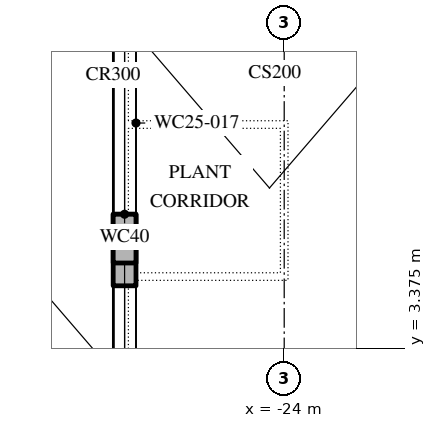
"""IFC4 building model, lengths in metres.
Left out: names, types, materials, properties, quantities, classifications, styles, units other than length and angle.
Written with IfcOpenShell. Run it as: python <this file> out.ifc"""

import sys

from ifc_helpers import new_model, si_unit, direction, frame, frame_2d, origin, place, context, subcontext, project, spatial, polyline, rectangle, outline, extrude, element, fill, save


model = new_model("IFC4")
c1 = context("Model", 3, precision=1e-05, world=origin(), true_north=direction((0.0, 1.0)))
c2 = subcontext(c1, "Body", "Model", "MODEL_VIEW")
j1 = project(units=[si_unit("LENGTHUNIT", "METRE"), si_unit("PLANEANGLEUNIT", "RADIAN")], contexts=[c1])
p1 = place(None, origin())
s1 = spatial("IfcSite", under=j1, at=p1, CompositionType="ELEMENT")
p2 = place(p1, origin())
s2 = spatial("IfcBuilding", under=s1, at=p2, CompositionType="ELEMENT")
p3 = place(p2, frame((0.0, 0.0, 394.2)))
s3 = spatial("IfcBuildingStorey", under=s2, at=p3, CompositionType="ELEMENT", Elevation=394.2)
p4 = place(p3, frame((-26.1, 11.996, 0.0), z_axis=(0.0, 0.0, 1.0), x_axis=(0.0, -1.0, 0.0)))
e1 = element("IfcWall", 1, at=p4, inside=s3, PredefinedType="STANDARD", context=c2, shape_type="SweptSolid", body=[
    extrude(rectangle(XDim=7.198, YDim=0.3, at=frame_2d((3.599, 0.0))), origin(), (0.0, 0.0, 1.0), 4.0),
])
p5 = place(p4, frame((1.756, 0.0, 0.8)))
e2 = element("IfcOpeningElement", 2, at=p5, cuts=e1, PredefinedType="OPENING", context=c2, shape_type="SweptSolid", body=[
    extrude(outline(polyline([(0.0, 0.0), (2.4, 0.0), (2.4, 1.25), (2.377, 1.488), (2.31, 1.717), (2.2, 1.929), (2.051, 2.116), (1.87, 2.272), (1.663, 2.391), (1.437, 2.468), (1.2, 2.5), (0.963, 2.468), (0.737, 2.391), (0.53, 2.272), (0.349, 2.116), (0.2, 1.929), (0.09, 1.717), (0.023, 1.488), (0.0, 1.25), (0.0, 0.0)])), frame((0.0, 0.16, 0.0), z_axis=(0.0, -1.0, 0.0), x_axis=(1.0, 0.0, 0.0)), (0.0, 0.0, 1.0), 0.32),
])
p6 = place(p4, frame((4.456, 0.0, 0.8)))
e3 = element("IfcOpeningElement", 3, at=p6, cuts=e1, PredefinedType="OPENING", context=c2, shape_type="SweptSolid", body=[
    extrude(outline(polyline([(0.0, 0.0), (2.4, 0.0), (2.4, 1.25), (2.377, 1.488), (2.31, 1.717), (2.2, 1.929), (2.051, 2.116), (1.87, 2.272), (1.663, 2.391), (1.437, 2.468), (1.2, 2.5), (0.963, 2.468), (0.737, 2.391), (0.53, 2.272), (0.349, 2.116), (0.2, 1.929), (0.09, 1.717), (0.023, 1.488), (0.0, 1.25), (0.0, 0.0)])), frame((0.0, 0.16, 0.0), z_axis=(0.0, -1.0, 0.0), x_axis=(1.0, 0.0, 0.0)), (0.0, 0.0, 1.0), 0.32),
])
p7 = place(p3, frame((-26.1, 11.996, 4.0), z_axis=(0.0, 0.0, 1.0), x_axis=(0.0, -1.0, 0.0)))
e4 = element("IfcWall", 4, at=p7, inside=s3, PredefinedType="STANDARD", context=c2, shape_type="SweptSolid", body=[
    extrude(outline(polyline([(0.0, 0.0), (7.198, 0.0), (7.198, 8.011), (0.0, 3.156), (0.0, 0.0)])), frame((0.0, 0.15, 0.0), z_axis=(0.0, -1.0, 0.0), x_axis=(1.0, 0.0, 0.0)), (0.0, 0.0, 1.0), 0.3),
])
p8 = place(p7, frame((1.756, 0.0, 0.8)))
e5 = element("IfcOpeningElement", 5, at=p8, cuts=e4, PredefinedType="OPENING", context=c2, shape_type="SweptSolid", body=[
    extrude(outline(polyline([(0.0, 0.0), (2.4, 0.0), (2.4, 1.0), (2.376, 1.221), (2.304, 1.431), (2.188, 1.621), (2.034, 1.781), (1.849, 1.904), (1.641, 1.983), (1.422, 2.016), (1.2, 2.0), (0.978, 2.016), (0.759, 1.983), (0.551, 1.904), (0.366, 1.781), (0.212, 1.621), (0.096, 1.431), (0.024, 1.221), (0.0, 1.0), (0.0, 0.0)])), frame((0.0, 0.16, 0.0), z_axis=(0.0, -1.0, 0.0), x_axis=(1.0, 0.0, 0.0)), (0.0, 0.0, 1.0), 0.32),
])
p9 = place(p7, frame((4.456, 0.0, 0.8)))
e6 = element("IfcOpeningElement", 6, at=p9, cuts=e4, PredefinedType="OPENING", context=c2, shape_type="SweptSolid", body=[
    extrude(outline(polyline([(0.0, 0.0), (2.4, 0.0), (2.4, 2.0), (2.379, 2.305), (2.318, 2.605), (2.216, 2.894), (2.077, 3.166), (1.902, 3.417), (1.695, 3.643), (1.46, 3.838), (1.2, 4.0), (0.94, 3.838), (0.705, 3.643), (0.498, 3.417), (0.323, 3.166), (0.184, 2.894), (0.082, 2.605), (0.021, 2.305), (0.0, 2.0), (0.0, 0.0)])), frame((0.0, 0.16, 0.0), z_axis=(0.0, -1.0, 0.0), x_axis=(1.0, 0.0, 0.0)), (0.0, 0.0, 1.0), 0.32),
])
p10 = place(p3, frame((-26.1, 4.798, 0.0), z_axis=(0.0, 0.0, 1.0), x_axis=(0.0, -1.0, 0.0)))
e7 = element("IfcWall", 7, at=p10, inside=s3, PredefinedType="STANDARD", context=c2, shape_type="SweptSolid", body=[
    extrude(rectangle(XDim=7.198, YDim=0.3, at=frame_2d((3.599, 0.0))), origin(), (0.0, 0.0, 1.0), 4.0),
])
p11 = place(p10, frame((0.6, 0.0, 0.8)))
e8 = element("IfcOpeningElement", 8, at=p11, cuts=e7, PredefinedType="OPENING", context=c2, shape_type="SweptSolid", body=[
    extrude(outline(polyline([(0.0, 0.0), (2.4, 0.0), (2.4, 1.25), (2.377, 1.488), (2.31, 1.717), (2.2, 1.929), (2.051, 2.116), (1.87, 2.272), (1.663, 2.391), (1.437, 2.468), (1.2, 2.5), (0.963, 2.468), (0.737, 2.391), (0.53, 2.272), (0.349, 2.116), (0.2, 1.929), (0.09, 1.717), (0.023, 1.488), (0.0, 1.25), (0.0, 0.0)])), frame((0.0, 0.16, 0.0), z_axis=(0.0, -1.0, 0.0), x_axis=(1.0, 0.0, 0.0)), (0.0, 0.0, 1.0), 0.32),
])
p12 = place(p10, frame((4.198, 0.0, 0.8)))
e9 = element("IfcOpeningElement", 9, at=p12, cuts=e7, PredefinedType="OPENING", context=c2, shape_type="SweptSolid", body=[
    extrude(outline(polyline([(0.0, 0.0), (2.4, 0.0), (2.4, 1.25), (2.377, 1.488), (2.31, 1.717), (2.2, 1.929), (2.051, 2.116), (1.87, 2.272), (1.663, 2.391), (1.437, 2.468), (1.2, 2.5), (0.963, 2.468), (0.737, 2.391), (0.53, 2.272), (0.349, 2.116), (0.2, 1.929), (0.09, 1.717), (0.023, 1.488), (0.0, 1.25), (0.0, 0.0)])), frame((0.0, 0.16, 0.0), z_axis=(0.0, -1.0, 0.0), x_axis=(1.0, 0.0, 0.0)), (0.0, 0.0, 1.0), 0.32),
])
p13 = place(p3, frame((-26.1, 4.798, 4.0), z_axis=(0.0, 0.0, 1.0), x_axis=(0.0, -1.0, 0.0)))
e10 = element("IfcWall", 10, at=p13, inside=s3, PredefinedType="STANDARD", context=c2, shape_type="SweptSolid", body=[
    extrude(outline(polyline([(0.0, 0.0), (7.198, 0.0), (7.198, 12.866), (0.0, 8.011), (0.0, 0.0)])), frame((0.0, 0.15, 0.0), z_axis=(0.0, -1.0, 0.0), x_axis=(1.0, 0.0, 0.0)), (0.0, 0.0, 1.0), 0.3),
])
p14 = place(p13, frame((0.3, 0.0, 1.0)))
e11 = element("IfcOpeningElement", 11, at=p14, cuts=e10, PredefinedType="OPENING", context=c2, shape_type="SweptSolid", body=[
    extrude(outline(polyline([(0.0, 0.0), (3.0, 0.0), (3.0, 2.5), (2.974, 2.882), (2.897, 3.256), (2.771, 3.617), (2.596, 3.958), (2.378, 4.272), (2.119, 4.553), (1.825, 4.798), (1.5, 5.0), (1.175, 4.798), (0.881, 4.553), (0.622, 4.272), (0.404, 3.958), (0.229, 3.617), (0.103, 3.256), (0.026, 2.882), (0.0, 2.5), (0.0, 0.0)])), frame((0.0, 0.16, 0.0), z_axis=(0.0, -1.0, 0.0), x_axis=(1.0, 0.0, 0.0)), (0.0, 0.0, 1.0), 0.32),
])
p15 = place(p13, frame((3.898, 0.0, 1.0)))
e12 = element("IfcOpeningElement", 12, at=p15, cuts=e10, PredefinedType="OPENING", context=c2, shape_type="SweptSolid", body=[
    extrude(outline(polyline([(0.0, 0.0), (3.0, 0.0), (3.0, 4.902), (2.974, 5.294), (2.898, 5.678), (2.772, 6.05), (2.598, 6.402), (2.38, 6.728), (2.121, 7.023), (1.826, 7.282), (1.5, 7.5), (1.174, 7.282), (0.879, 7.023), (0.62, 6.728), (0.402, 6.402), (0.228, 6.05), (0.102, 5.678), (0.026, 5.294), (0.0, 4.902), (0.0, 0.0)])), frame((0.0, 0.16, 0.0), z_axis=(0.0, -1.0, 0.0), x_axis=(1.0, 0.0, 0.0)), (0.0, 0.0, 1.0), 0.32),
])
p16 = place(p6, origin())
e13 = element("IfcWindow", 13, at=p16, inside=s3, PartitioningType="DOUBLE_PANEL_VERTICAL", PredefinedType="WINDOW", context=c2, shape_type="SweptSolid", body=[
    extrude(outline(polyline([(0.0, 0.0), (2.4, 0.0), (2.4, 1.25), (2.377, 1.488), (2.31, 1.717), (2.2, 1.929), (2.051, 2.116), (1.87, 2.272), (1.663, 2.391), (1.437, 2.468), (1.2, 2.5), (0.963, 2.468), (0.737, 2.391), (0.53, 2.272), (0.349, 2.116), (0.2, 1.929), (0.09, 1.717), (0.023, 1.488), (0.0, 1.25), (0.0, 0.0)])), frame((0.0, 0.03, 0.0), z_axis=(0.0, -1.0, 0.0), x_axis=(1.0, 0.0, 0.0)), (0.0, 0.0, 1.0), 0.06),
])
fill(e3, e13)
p17 = place(p9, origin())
e14 = element("IfcWindow", 14, at=p17, inside=s3, PartitioningType="DOUBLE_PANEL_VERTICAL", PredefinedType="WINDOW", context=c2, shape_type="SweptSolid", body=[
    extrude(outline(polyline([(0.0, 0.0), (2.4, 0.0), (2.4, 2.0), (2.379, 2.305), (2.318, 2.605), (2.216, 2.894), (2.077, 3.166), (1.902, 3.417), (1.695, 3.643), (1.46, 3.838), (1.2, 4.0), (0.94, 3.838), (0.705, 3.643), (0.498, 3.417), (0.323, 3.166), (0.184, 2.894), (0.082, 2.605), (0.021, 2.305), (0.0, 2.0), (0.0, 0.0)])), frame((0.0, 0.03, 0.0), z_axis=(0.0, -1.0, 0.0), x_axis=(1.0, 0.0, 0.0)), (0.0, 0.0, 1.0), 0.06),
])
fill(e6, e14)
p18 = place(p11, origin())
e15 = element("IfcWindow", 15, at=p18, inside=s3, PartitioningType="DOUBLE_PANEL_VERTICAL", PredefinedType="WINDOW", context=c2, shape_type="SweptSolid", body=[
    extrude(outline(polyline([(0.0, 0.0), (2.4, 0.0), (2.4, 1.25), (2.377, 1.488), (2.31, 1.717), (2.2, 1.929), (2.051, 2.116), (1.87, 2.272), (1.663, 2.391), (1.437, 2.468), (1.2, 2.5), (0.963, 2.468), (0.737, 2.391), (0.53, 2.272), (0.349, 2.116), (0.2, 1.929), (0.09, 1.717), (0.023, 1.488), (0.0, 1.25), (0.0, 0.0)])), frame((0.0, 0.03, 0.0), z_axis=(0.0, -1.0, 0.0), x_axis=(1.0, 0.0, 0.0)), (0.0, 0.0, 1.0), 0.06),
])
fill(e8, e15)
p19 = place(p14, origin())
e16 = element("IfcWindow", 16, at=p19, inside=s3, PartitioningType="DOUBLE_PANEL_VERTICAL", PredefinedType="WINDOW", context=c2, shape_type="SweptSolid", body=[
    extrude(outline(polyline([(0.0, 0.0), (3.0, 0.0), (3.0, 2.5), (2.974, 2.882), (2.897, 3.256), (2.771, 3.617), (2.596, 3.958), (2.378, 4.272), (2.119, 4.553), (1.825, 4.798), (1.5, 5.0), (1.175, 4.798), (0.881, 4.553), (0.622, 4.272), (0.404, 3.958), (0.229, 3.617), (0.103, 3.256), (0.026, 2.882), (0.0, 2.5), (0.0, 0.0)])), frame((0.0, 0.03, 0.0), z_axis=(0.0, -1.0, 0.0), x_axis=(1.0, 0.0, 0.0)), (0.0, 0.0, 1.0), 0.06),
])
fill(e11, e16)
save(model, sys.argv[1])
